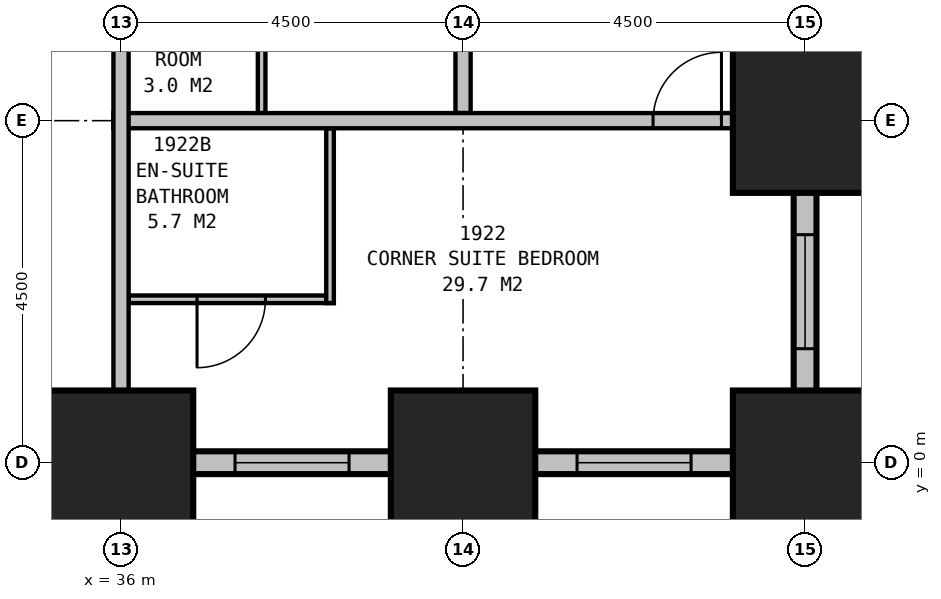
"""IFC4 building model, lengths in metres.
Left out: names, types, materials, properties, quantities, classifications, styles, units other than length and angle.
Written with IfcOpenShell. Run it as: python <this file> out.ifc"""

import sys

from ifc_helpers import new_model, si_unit, direction, frame, frame_2d, origin, origin_2d, place, context, subcontext, project, spatial, rectangle, extrude, element, fill, save


model = new_model("IFC4")
c1 = context("Model", 3, precision=1e-05, world=origin(), true_north=direction((0.0, 1.0)))
c2 = subcontext(c1, "Body", "Model", "MODEL_VIEW")
j1 = project(units=[si_unit("LENGTHUNIT", "METRE"), si_unit("PLANEANGLEUNIT", "RADIAN")], contexts=[c1])
p1 = place(None, origin())
s1 = spatial("IfcSite", under=j1, at=p1, CompositionType="ELEMENT")
p2 = place(p1, origin())
s2 = spatial("IfcBuilding", under=s1, at=p2, CompositionType="ELEMENT")
p3 = place(p2, frame((0.0, 0.0, 78.7)))
s3 = spatial("IfcBuildingStorey", under=s2, at=p3, CompositionType="ELEMENT", Elevation=78.7)
for number, where, z_axis, x_axis in (
    (1, (36.0, 0.0, 0.0), (0.0, 0.0, 1.0), (1.0, 0.0, 0.0)),
    (2, (40.5, 0.0, 0.0), (0.0, 0.0, 1.0), (1.0, 0.0, 0.0)),
    (3, (45.0, 0.0, 0.0), (0.0, 0.0, 1.0), (1.0, 0.0, 0.0)),
    (4, (45.0, 4.5, 0.0), (0.0, 0.0, 1.0), (1.0, 0.0, 0.0)),
):
    element("IfcColumn", number, at=place(p3, frame(where, z_axis=z_axis, x_axis=x_axis)), inside=s3, PredefinedType="COLUMN", context=c2, shape_type="SweptSolid", body=[
        extrude(rectangle(XDim=1.9, YDim=1.9, at=origin_2d()), origin(), (0.0, 0.0, 1.0), 3.5),
    ])
p4 = place(p3, frame((4.35, 0.0, 0.0), z_axis=(0.0, 0.0, 1.0), x_axis=(1.0, 0.0, 0.0)))
e5 = element("IfcWall", 5, at=p4, inside=s3, PredefinedType="STANDARD", context=c2, shape_type="SweptSolid", body=[
    extrude(rectangle(XDim=40.8, YDim=0.3, at=frame_2d((20.4, 0.0))), origin(), (0.0, 0.0, 1.0), 2.05),
])
p5 = place(p4, frame((1.65, 0.0, 0.5)))
e6 = element("IfcOpeningElement", 6, at=p5, cuts=e5, PredefinedType="OPENING", context=c2, shape_type="SweptSolid", body=[
    extrude(rectangle(XDim=1.5, YDim=1.4, at=frame_2d((0.75, 0.7))), frame((0.0, 0.16, 0.0), z_axis=(0.0, -1.0, 0.0), x_axis=(1.0, 0.0, 0.0)), (0.0, 0.0, 1.0), 0.32),
])
p6 = place(p4, frame((6.15, 0.0, 0.5)))
e7 = element("IfcOpeningElement", 7, at=p6, cuts=e5, PredefinedType="OPENING", context=c2, shape_type="SweptSolid", body=[
    extrude(rectangle(XDim=1.5, YDim=1.4, at=frame_2d((0.75, 0.7))), frame((0.0, 0.16, 0.0), z_axis=(0.0, -1.0, 0.0), x_axis=(1.0, 0.0, 0.0)), (0.0, 0.0, 1.0), 0.32),
])
p7 = place(p4, frame((10.65, 0.0, 0.5)))
e8 = element("IfcOpeningElement", 8, at=p7, cuts=e5, PredefinedType="OPENING", context=c2, shape_type="SweptSolid", body=[
    extrude(rectangle(XDim=1.5, YDim=1.4, at=frame_2d((0.75, 0.7))), frame((0.0, 0.16, 0.0), z_axis=(0.0, -1.0, 0.0), x_axis=(1.0, 0.0, 0.0)), (0.0, 0.0, 1.0), 0.32),
])
p8 = place(p4, frame((15.15, 0.0, 0.5)))
e9 = element("IfcOpeningElement", 9, at=p8, cuts=e5, PredefinedType="OPENING", context=c2, shape_type="SweptSolid", body=[
    extrude(rectangle(XDim=1.5, YDim=1.4, at=frame_2d((0.75, 0.7))), frame((0.0, 0.16, 0.0), z_axis=(0.0, -1.0, 0.0), x_axis=(1.0, 0.0, 0.0)), (0.0, 0.0, 1.0), 0.32),
])
p9 = place(p4, frame((19.65, 0.0, 0.5)))
e10 = element("IfcOpeningElement", 10, at=p9, cuts=e5, PredefinedType="OPENING", context=c2, shape_type="SweptSolid", body=[
    extrude(rectangle(XDim=1.5, YDim=1.4, at=frame_2d((0.75, 0.7))), frame((0.0, 0.16, 0.0), z_axis=(0.0, -1.0, 0.0), x_axis=(1.0, 0.0, 0.0)), (0.0, 0.0, 1.0), 0.32),
])
p10 = place(p4, frame((24.15, 0.0, 0.5)))
e11 = element("IfcOpeningElement", 11, at=p10, cuts=e5, PredefinedType="OPENING", context=c2, shape_type="SweptSolid", body=[
    extrude(rectangle(XDim=1.5, YDim=1.4, at=frame_2d((0.75, 0.7))), frame((0.0, 0.16, 0.0), z_axis=(0.0, -1.0, 0.0), x_axis=(1.0, 0.0, 0.0)), (0.0, 0.0, 1.0), 0.32),
])
p11 = place(p4, frame((28.65, 0.0, 0.5)))
e12 = element("IfcOpeningElement", 12, at=p11, cuts=e5, PredefinedType="OPENING", context=c2, shape_type="SweptSolid", body=[
    extrude(rectangle(XDim=1.5, YDim=1.4, at=frame_2d((0.75, 0.7))), frame((0.0, 0.16, 0.0), z_axis=(0.0, -1.0, 0.0), x_axis=(1.0, 0.0, 0.0)), (0.0, 0.0, 1.0), 0.32),
])
p12 = place(p4, frame((33.15, 0.0, 0.5)))
e13 = element("IfcOpeningElement", 13, at=p12, cuts=e5, PredefinedType="OPENING", context=c2, shape_type="SweptSolid", body=[
    extrude(rectangle(XDim=1.5, YDim=1.4, at=frame_2d((0.75, 0.7))), frame((0.0, 0.16, 0.0), z_axis=(0.0, -1.0, 0.0), x_axis=(1.0, 0.0, 0.0)), (0.0, 0.0, 1.0), 0.32),
])
p13 = place(p4, frame((37.65, 0.0, 0.5)))
e14 = element("IfcOpeningElement", 14, at=p13, cuts=e5, PredefinedType="OPENING", context=c2, shape_type="SweptSolid", body=[
    extrude(rectangle(XDim=1.5, YDim=1.4, at=frame_2d((0.75, 0.7))), frame((0.0, 0.16, 0.0), z_axis=(0.0, -1.0, 0.0), x_axis=(1.0, 0.0, 0.0)), (0.0, 0.0, 1.0), 0.32),
])
p14 = place(p3, frame((45.0, -0.15, 0.0), z_axis=(0.0, 0.0, 1.0), x_axis=(0.0, 1.0, 0.0)))
e15 = element("IfcWall", 15, at=p14, inside=s3, PredefinedType="STANDARD", context=c2, shape_type="SweptSolid", body=[
    extrude(rectangle(XDim=4.8, YDim=0.3, at=frame_2d((2.4, 0.0))), origin(), (0.0, 0.0, 1.0), 2.05),
])
p15 = place(p14, frame((1.65, 0.0, 0.5)))
e16 = element("IfcOpeningElement", 16, at=p15, cuts=e15, PredefinedType="OPENING", context=c2, shape_type="SweptSolid", body=[
    extrude(rectangle(XDim=1.5, YDim=1.4, at=frame_2d((0.75, 0.7))), frame((0.0, 0.16, 0.0), z_axis=(0.0, -1.0, 0.0), x_axis=(1.0, 0.0, 0.0)), (0.0, 0.0, 1.0), 0.32),
])
p16 = place(p3, frame((44.85, 4.5, 0.0), z_axis=(0.0, 0.0, 1.0), x_axis=(1.0, 0.0, 0.0)))
e17 = element("IfcWall", 17, at=p16, inside=s3, PredefinedType="STANDARD", context=c2, shape_type="SweptSolid", body=[
    extrude(rectangle(XDim=4.3, YDim=0.3, at=frame_2d((2.15, 0.0))), origin(), (0.0, 0.0, 1.0), 2.05),
])
p17 = place(p16, frame((1.4, 0.0, 0.5)))
e18 = element("IfcOpeningElement", 18, at=p17, cuts=e17, PredefinedType="OPENING", context=c2, shape_type="SweptSolid", body=[
    extrude(rectangle(XDim=1.5, YDim=1.4, at=frame_2d((0.75, 0.7))), frame((0.0, 0.16, 0.0), z_axis=(0.0, -1.0, 0.0), x_axis=(1.0, 0.0, 0.0)), (0.0, 0.0, 1.0), 0.32),
])
p18 = place(p3, frame((49.017, 4.351, 0.0), z_axis=(0.0, 0.0, 1.0), x_axis=(-0.110433201132, 0.993883548555, 0.0)))
e19 = element("IfcWall", 19, at=p18, inside=s3, PredefinedType="STANDARD", context=c2, shape_type="SweptSolid", body=[
    extrude(rectangle(XDim=31.994, YDim=0.3, at=frame_2d((15.997, 0.0))), origin(), (0.0, 0.0, 1.0), 2.05),
])
p19 = place(p18, frame((1.664, 0.0, 0.5)))
e20 = element("IfcOpeningElement", 20, at=p19, cuts=e19, PredefinedType="OPENING", context=c2, shape_type="SweptSolid", body=[
    extrude(rectangle(XDim=1.5, YDim=1.4, at=frame_2d((0.75, 0.7))), frame((0.0, 0.16, 0.0), z_axis=(0.0, -1.0, 0.0), x_axis=(1.0, 0.0, 0.0)), (0.0, 0.0, 1.0), 0.32),
])
p20 = place(p18, frame((6.192, 0.0, 0.5)))
e21 = element("IfcOpeningElement", 21, at=p20, cuts=e19, PredefinedType="OPENING", context=c2, shape_type="SweptSolid", body=[
    extrude(rectangle(XDim=1.5, YDim=1.4, at=frame_2d((0.75, 0.7))), frame((0.0, 0.16, 0.0), z_axis=(0.0, -1.0, 0.0), x_axis=(1.0, 0.0, 0.0)), (0.0, 0.0, 1.0), 0.32),
])
p21 = place(p18, frame((10.719, 0.0, 0.5)))
e22 = element("IfcOpeningElement", 22, at=p21, cuts=e19, PredefinedType="OPENING", context=c2, shape_type="SweptSolid", body=[
    extrude(rectangle(XDim=1.5, YDim=1.4, at=frame_2d((0.75, 0.7))), frame((0.0, 0.16, 0.0), z_axis=(0.0, -1.0, 0.0), x_axis=(1.0, 0.0, 0.0)), (0.0, 0.0, 1.0), 0.32),
])
p22 = place(p18, frame((15.247, 0.0, 0.5)))
e23 = element("IfcOpeningElement", 23, at=p22, cuts=e19, PredefinedType="OPENING", context=c2, shape_type="SweptSolid", body=[
    extrude(rectangle(XDim=1.5, YDim=1.4, at=frame_2d((0.75, 0.7))), frame((0.0, 0.16, 0.0), z_axis=(0.0, -1.0, 0.0), x_axis=(1.0, 0.0, 0.0)), (0.0, 0.0, 1.0), 0.32),
])
p23 = place(p18, frame((19.775, 0.0, 0.5)))
e24 = element("IfcOpeningElement", 24, at=p23, cuts=e19, PredefinedType="OPENING", context=c2, shape_type="SweptSolid", body=[
    extrude(rectangle(XDim=1.5, YDim=1.4, at=frame_2d((0.75, 0.7))), frame((0.0, 0.16, 0.0), z_axis=(0.0, -1.0, 0.0), x_axis=(1.0, 0.0, 0.0)), (0.0, 0.0, 1.0), 0.32),
])
p24 = place(p18, frame((24.302, 0.0, 0.5)))
e25 = element("IfcOpeningElement", 25, at=p24, cuts=e19, PredefinedType="OPENING", context=c2, shape_type="SweptSolid", body=[
    extrude(rectangle(XDim=1.5, YDim=1.4, at=frame_2d((0.75, 0.7))), frame((0.0, 0.16, 0.0), z_axis=(0.0, -1.0, 0.0), x_axis=(1.0, 0.0, 0.0)), (0.0, 0.0, 1.0), 0.32),
])
p25 = place(p18, frame((28.83, 0.0, 0.5)))
e26 = element("IfcOpeningElement", 26, at=p25, cuts=e19, PredefinedType="OPENING", context=c2, shape_type="SweptSolid", body=[
    extrude(rectangle(XDim=1.5, YDim=1.4, at=frame_2d((0.75, 0.7))), frame((0.0, 0.16, 0.0), z_axis=(0.0, -1.0, 0.0), x_axis=(1.0, 0.0, 0.0)), (0.0, 0.0, 1.0), 0.32),
])
p26 = place(p3, frame((36.0, 10.6, 0.0), z_axis=(0.0, 0.0, 1.0), x_axis=(0.0, -1.0, 0.0)))
e27 = element("IfcWall", 27, at=p26, inside=s3, PredefinedType="PARTITIONING", context=c2, shape_type="SweptSolid", body=[
    extrude(rectangle(XDim=10.6, YDim=0.2, at=frame_2d((5.3, 0.0))), origin(), (0.0, 0.0, 1.0), 2.25),
])
p27 = place(p3, frame((35.9, 4.5, 0.0), z_axis=(0.0, 0.0, 1.0), x_axis=(1.0, 0.0, 0.0)))
e28 = element("IfcWall", 28, at=p27, inside=s3, PredefinedType="PARTITIONING", context=c2, shape_type="SweptSolid", body=[
    extrude(rectangle(XDim=9.1, YDim=0.2, at=frame_2d((4.55, 0.0))), origin(), (0.0, 0.0, 1.0), 3.25),
])
p28 = place(p27, frame((7.1, 0.0, 0.0)))
e29 = element("IfcOpeningElement", 29, at=p28, cuts=e28, PredefinedType="OPENING", context=c2, shape_type="SweptSolid", body=[
    extrude(rectangle(XDim=0.9, YDim=2.1, at=frame_2d((0.45, 1.05))), frame((0.0, 0.11, 0.0), z_axis=(0.0, -1.0, 0.0), x_axis=(1.0, 0.0, 0.0)), (0.0, 0.0, 1.0), 0.22),
])
p29 = place(p3, frame((40.5, 4.6, 0.0), z_axis=(0.0, 0.0, 1.0), x_axis=(0.0, 1.0, 0.0)))
e30 = element("IfcWall", 30, at=p29, inside=s3, PredefinedType="PARTITIONING", context=c2, shape_type="SweptSolid", body=[
    extrude(rectangle(XDim=8.8, YDim=0.2, at=frame_2d((4.4, 0.0))), origin(), (0.0, 0.0, 1.0), 2.25),
])
p30 = place(p29, frame((4.05, 0.0, 0.0)))
e31 = element("IfcOpeningElement", 31, at=p30, cuts=e30, PredefinedType="OPENING", context=c2, shape_type="SweptSolid", body=[
    extrude(rectangle(XDim=0.9, YDim=2.1, at=frame_2d((0.45, 1.05))), frame((0.0, 0.11, 0.0), z_axis=(0.0, -1.0, 0.0), x_axis=(1.0, 0.0, 0.0)), (0.0, 0.0, 1.0), 0.22),
])
p31 = place(p3, frame((37.85, 4.6, 0.0), z_axis=(0.0, 0.0, 1.0), x_axis=(0.0, 1.0, 0.0)))
e32 = element("IfcWall", 32, at=p31, inside=s3, PredefinedType="PLUMBINGWALL", context=c2, shape_type="SweptSolid", body=[
    extrude(rectangle(XDim=2.0, YDim=0.1, at=frame_2d((1.0, 0.0))), origin(), (0.0, 0.0, 1.0), 3.25),
])
p32 = place(p3, frame((38.75, 4.4, 0.0), z_axis=(0.0, 0.0, 1.0), x_axis=(0.0, -1.0, 0.0)))
e33 = element("IfcWall", 33, at=p32, inside=s3, PredefinedType="PLUMBINGWALL", context=c2, shape_type="SweptSolid", body=[
    extrude(rectangle(XDim=2.3, YDim=0.1, at=frame_2d((1.15, 0.0))), origin(), (0.0, 0.0, 1.0), 3.25),
])
p33 = place(p3, frame((36.1, 2.15, 0.0), z_axis=(0.0, 0.0, 1.0), x_axis=(1.0, 0.0, 0.0)))
e34 = element("IfcWall", 34, at=p33, inside=s3, PredefinedType="PLUMBINGWALL", context=c2, shape_type="SweptSolid", body=[
    extrude(rectangle(XDim=2.7, YDim=0.1, at=frame_2d((1.35, 0.0))), origin(), (0.0, 0.0, 1.0), 3.25),
])
p34 = place(p33, frame((1.8, 0.0, 0.0), z_axis=(0.0, 0.0, 1.0), x_axis=(-1.0, 0.0, 0.0)))
e35 = element("IfcOpeningElement", 35, at=p34, cuts=e34, PredefinedType="OPENING", context=c2, shape_type="SweptSolid", body=[
    extrude(rectangle(XDim=0.9, YDim=2.1, at=frame_2d((0.45, 1.05))), frame((0.0, 0.06, 0.0), z_axis=(0.0, -1.0, 0.0), x_axis=(1.0, 0.0, 0.0)), (0.0, 0.0, 1.0), 0.12),
])
p35 = place(p12, origin())
e36 = element("IfcWindow", 36, at=p35, inside=s3, PartitioningType="SINGLE_PANEL", PredefinedType="WINDOW", context=c2, shape_type="SweptSolid", body=[
    extrude(rectangle(XDim=1.5, YDim=1.4, at=frame_2d((0.75, 0.7))), frame((0.0, 0.03, 0.0), z_axis=(0.0, -1.0, 0.0), x_axis=(1.0, 0.0, 0.0)), (0.0, 0.0, 1.0), 0.06),
])
fill(e13, e36)
p36 = place(p13, origin())
e37 = element("IfcWindow", 37, at=p36, inside=s3, PartitioningType="SINGLE_PANEL", PredefinedType="WINDOW", context=c2, shape_type="SweptSolid", body=[
    extrude(rectangle(XDim=1.5, YDim=1.4, at=frame_2d((0.75, 0.7))), frame((0.0, 0.03, 0.0), z_axis=(0.0, -1.0, 0.0), x_axis=(1.0, 0.0, 0.0)), (0.0, 0.0, 1.0), 0.06),
])
fill(e14, e37)
p37 = place(p15, origin())
e38 = element("IfcWindow", 38, at=p37, inside=s3, PartitioningType="SINGLE_PANEL", PredefinedType="WINDOW", context=c2, shape_type="SweptSolid", body=[
    extrude(rectangle(XDim=1.5, YDim=1.4, at=frame_2d((0.75, 0.7))), frame((0.0, 0.03, 0.0), z_axis=(0.0, -1.0, 0.0), x_axis=(1.0, 0.0, 0.0)), (0.0, 0.0, 1.0), 0.06),
])
fill(e16, e38)
p38 = place(p28, origin())
e39 = element("IfcDoor", 39, at=p38, inside=s3, OperationType="SINGLE_SWING_RIGHT", PredefinedType="DOOR", context=c2, shape_type="SweptSolid", body=[
    extrude(rectangle(XDim=0.9, YDim=2.1, at=frame_2d((0.45, 1.05))), frame((0.0, 0.025, 0.0), z_axis=(0.0, -1.0, 0.0), x_axis=(1.0, 0.0, 0.0)), (0.0, 0.0, 1.0), 0.05),
])
fill(e29, e39)
p39 = place(p34, origin())
e40 = element("IfcDoor", 40, at=p39, inside=s3, OperationType="SINGLE_SWING_RIGHT", PredefinedType="DOOR", context=c2, shape_type="SweptSolid", body=[
    extrude(rectangle(XDim=0.9, YDim=2.1, at=frame_2d((0.45, 1.05))), frame((0.0, 0.025, 0.0), z_axis=(0.0, -1.0, 0.0), x_axis=(1.0, 0.0, 0.0)), (0.0, 0.0, 1.0), 0.05),
])
fill(e35, e40)
save(model, sys.argv[1])
